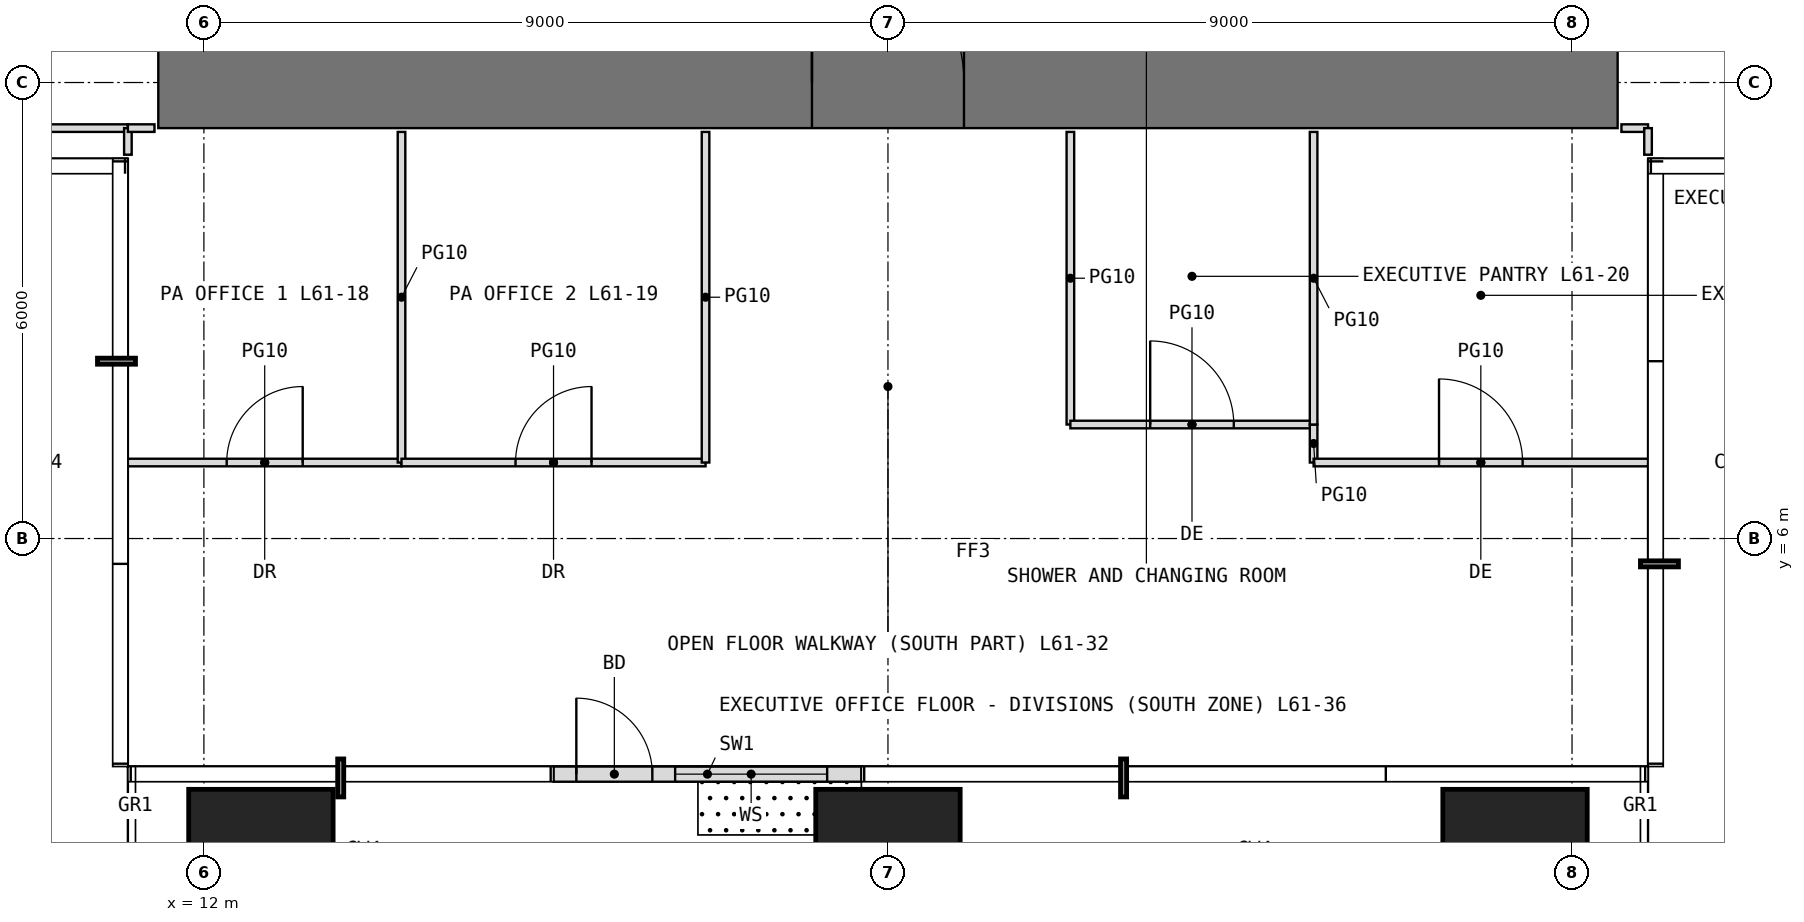
"""IFC4 building model, lengths in metres.
Left out: names, types, materials, properties, quantities, classifications, styles, units other than length and angle.
Written with IfcOpenShell. Run it as: python <this file> out.ifc"""

import sys

from ifc_helpers import new_model, si_unit, direction, frame, frame_2d, origin, origin_2d, place, context, subcontext, project, spatial, rectangle, extrude, element, fill, save


model = new_model("IFC4")
c1 = context("Model", 3, precision=1e-05, world=origin(), true_north=direction((0.0, 1.0)))
c2 = subcontext(c1, "Body", "Model", "MODEL_VIEW")
j1 = project(units=[si_unit("LENGTHUNIT", "METRE"), si_unit("PLANEANGLEUNIT", "RADIAN")], contexts=[c1])
p1 = place(None, origin())
s1 = spatial("IfcSite", under=j1, at=p1, CompositionType="ELEMENT")
p2 = place(p1, origin())
s2 = spatial("IfcBuilding", under=s1, at=p2, CompositionType="ELEMENT")
p3 = place(p2, frame((0.0, 0.0, 256.6)))
s3 = spatial("IfcBuildingStorey", under=s2, at=p3, CompositionType="ELEMENT", Elevation=256.6)
for number, where, z_axis, x_axis in (
    (1, (12.75, 1.75, 0.0), (0.0, 0.0, 1.0), (1.0, 0.0, 0.0)),
    (2, (21.0, 1.75, 0.0), (0.0, 0.0, 1.0), (1.0, 0.0, 0.0)),
    (3, (29.25, 1.75, 0.0), (0.0, 0.0, 1.0), (1.0, 0.0, 0.0)),
):
    element("IfcColumn", number, at=place(p3, frame(where, z_axis=z_axis, x_axis=x_axis)), inside=s3, PredefinedType="COLUMN", context=c2, shape_type="SweptSolid", body=[
        extrude(rectangle(XDim=1.9, YDim=1.9, at=origin_2d()), origin(), (0.0, 0.0, 1.0), 4.2),
    ])
p4 = place(p3, frame((16.6, 2.9, 0.0), z_axis=(0.0, 0.0, 1.0), x_axis=(1.0, 0.0, 0.0)))
e4 = element("IfcWall", 4, at=p4, inside=s3, PredefinedType="USERDEFINED", context=c2, shape_type="SweptSolid", body=[
    extrude(rectangle(XDim=4.05, YDim=0.2, at=frame_2d((2.025, 0.0))), origin(), (0.0, 0.0, 1.0), 3.95),
])
p5 = place(p4, frame((0.3, 0.0, 0.0)))
e5 = element("IfcOpeningElement", 5, at=p5, cuts=e4, PredefinedType="OPENING", context=c2, shape_type="SweptSolid", body=[
    extrude(rectangle(XDim=1.0, YDim=2.4, at=frame_2d((0.5, 1.2))), frame((0.0, 0.11, 0.0), z_axis=(0.0, -1.0, 0.0), x_axis=(1.0, 0.0, 0.0)), (0.0, 0.0, 1.0), 0.22),
])
p6 = place(p4, frame((1.6, 0.0, 0.3)))
e6 = element("IfcOpeningElement", 6, at=p6, cuts=e4, PredefinedType="OPENING", context=c2, shape_type="SweptSolid", body=[
    extrude(rectangle(XDim=2.0, YDim=2.7, at=frame_2d((1.0, 1.35))), frame((0.0, 0.11, 0.0), z_axis=(0.0, -1.0, 0.0), x_axis=(1.0, 0.0, 0.0)), (0.0, 0.0, 1.0), 0.22),
])
p7 = place(p3, frame((11.4, 12.0, -0.05), z_axis=(0.0, 0.0, 1.0), x_axis=(1.0, 0.0, 0.0)))
e7 = element("IfcWall", 7, at=p7, inside=s3, PredefinedType="SHEAR", context=c2, shape_type="SweptSolid", body=[
    extrude(rectangle(XDim=19.2, YDim=1.2, at=frame_2d((9.6, 0.0))), origin(), (0.0, 0.0, 1.0), 4.2),
])
p8 = place(p7, frame((8.6, 0.0, 0.05)))
e8 = element("IfcOpeningElement", 8, at=p8, cuts=e7, PredefinedType="OPENING", context=c2, shape_type="SweptSolid", body=[
    extrude(rectangle(XDim=2.0, YDim=2.2, at=frame_2d((1.0, 1.1))), frame((0.0, 0.61, 0.0), z_axis=(0.0, -1.0, 0.0), x_axis=(1.0, 0.0, 0.0)), (0.0, 0.0, 1.0), 1.22),
])
p9 = place(p3, frame((8.4, 11.4, 0.0), z_axis=(0.0, 0.0, 1.0), x_axis=(1.0, 0.0, 0.0)))
e9 = element("IfcWall", 9, at=p9, inside=s3, PredefinedType="PARTITIONING", context=c2, shape_type="SweptSolid", body=[
    extrude(rectangle(XDim=2.6, YDim=0.1, at=frame_2d((1.3, 0.0))), origin(), (0.0, 0.0, 1.0), 3.95),
])
p10 = place(p3, frame((11.0, 7.0, 0.0), z_axis=(0.0, 0.0, 1.0), x_axis=(1.0, 0.0, 0.0)))
e10 = element("IfcWall", 10, at=p10, inside=s3, PredefinedType="PARTITIONING", context=c2, shape_type="SweptSolid", body=[
    extrude(rectangle(XDim=3.6, YDim=0.1, at=frame_2d((1.8, 0.0))), origin(), (0.0, 0.0, 1.0), 3.95),
])
p11 = place(p10, frame((1.3, 0.0, 0.0)))
e11 = element("IfcOpeningElement", 11, at=p11, cuts=e10, PredefinedType="OPENING", context=c2, shape_type="SweptSolid", body=[
    extrude(rectangle(XDim=1.0, YDim=2.2, at=frame_2d((0.5, 1.1))), frame((0.0, 0.06, 0.0), z_axis=(0.0, -1.0, 0.0), x_axis=(1.0, 0.0, 0.0)), (0.0, 0.0, 1.0), 0.12),
])
p12 = place(p3, frame((11.0, 11.05, 0.0), z_axis=(0.0, 0.0, 1.0), x_axis=(0.0, 1.0, 0.0)))
e12 = element("IfcWall", 12, at=p12, inside=s3, PredefinedType="PARTITIONING", context=c2, shape_type="SweptSolid", body=[
    extrude(rectangle(XDim=0.35, YDim=0.1, at=frame_2d((0.175, 0.0))), origin(), (0.0, 0.0, 1.0), 3.95),
])
p13 = place(p3, frame((11.0, 11.4, 0.0), z_axis=(0.0, 0.0, 1.0), x_axis=(1.0, 0.0, 0.0)))
e13 = element("IfcWall", 13, at=p13, inside=s3, PredefinedType="PARTITIONING", context=c2, shape_type="SweptSolid", body=[
    extrude(rectangle(XDim=0.35, YDim=0.1, at=frame_2d((0.175, 0.0))), origin(), (0.0, 0.0, 1.0), 3.95),
])
p14 = place(p3, frame((14.6, 7.0, 0.0), z_axis=(0.0, 0.0, 1.0), x_axis=(0.0, 1.0, 0.0)))
e14 = element("IfcWall", 14, at=p14, inside=s3, PredefinedType="PARTITIONING", context=c2, shape_type="SweptSolid", body=[
    extrude(rectangle(XDim=4.35, YDim=0.1, at=frame_2d((2.175, 0.0))), origin(), (0.0, 0.0, 1.0), 3.95),
])
p15 = place(p3, frame((14.6, 7.0, 0.0), z_axis=(0.0, 0.0, 1.0), x_axis=(1.0, 0.0, 0.0)))
e15 = element("IfcWall", 15, at=p15, inside=s3, PredefinedType="PARTITIONING", context=c2, shape_type="SweptSolid", body=[
    extrude(rectangle(XDim=4.0, YDim=0.1, at=frame_2d((2.0, 0.0))), origin(), (0.0, 0.0, 1.0), 3.95),
])
p16 = place(p15, frame((1.5, 0.0, 0.0)))
e16 = element("IfcOpeningElement", 16, at=p16, cuts=e15, PredefinedType="OPENING", context=c2, shape_type="SweptSolid", body=[
    extrude(rectangle(XDim=1.0, YDim=2.2, at=frame_2d((0.5, 1.1))), frame((0.0, 0.06, 0.0), z_axis=(0.0, -1.0, 0.0), x_axis=(1.0, 0.0, 0.0)), (0.0, 0.0, 1.0), 0.12),
])
p17 = place(p3, frame((18.6, 7.0, 0.0), z_axis=(0.0, 0.0, 1.0), x_axis=(0.0, 1.0, 0.0)))
e17 = element("IfcWall", 17, at=p17, inside=s3, PredefinedType="PARTITIONING", context=c2, shape_type="SweptSolid", body=[
    extrude(rectangle(XDim=4.35, YDim=0.1, at=frame_2d((2.175, 0.0))), origin(), (0.0, 0.0, 1.0), 3.95),
])
p18 = place(p3, frame((23.4, 7.5, 0.0), z_axis=(0.0, 0.0, 1.0), x_axis=(0.0, 1.0, 0.0)))
e18 = element("IfcWall", 18, at=p18, inside=s3, PredefinedType="PARTITIONING", context=c2, shape_type="SweptSolid", body=[
    extrude(rectangle(XDim=3.85, YDim=0.1, at=frame_2d((1.925, 0.0))), origin(), (0.0, 0.0, 1.0), 3.95),
])
p19 = place(p3, frame((23.4, 7.5, 0.0), z_axis=(0.0, 0.0, 1.0), x_axis=(1.0, 0.0, 0.0)))
e19 = element("IfcWall", 19, at=p19, inside=s3, PredefinedType="PARTITIONING", context=c2, shape_type="SweptSolid", body=[
    extrude(rectangle(XDim=3.2, YDim=0.1, at=frame_2d((1.6, 0.0))), origin(), (0.0, 0.0, 1.0), 3.95),
])
p20 = place(p19, frame((1.05, 0.0, 0.0)))
e20 = element("IfcOpeningElement", 20, at=p20, cuts=e19, PredefinedType="OPENING", context=c2, shape_type="SweptSolid", body=[
    extrude(rectangle(XDim=1.1, YDim=2.3, at=frame_2d((0.55, 1.15))), frame((0.0, 0.06, 0.0), z_axis=(0.0, -1.0, 0.0), x_axis=(1.0, 0.0, 0.0)), (0.0, 0.0, 1.0), 0.12),
])
p21 = place(p3, frame((26.6, 7.0, 0.0), z_axis=(0.0, 0.0, 1.0), x_axis=(0.0, 1.0, 0.0)))
e21 = element("IfcWall", 21, at=p21, inside=s3, PredefinedType="PARTITIONING", context=c2, shape_type="SweptSolid", body=[
    extrude(rectangle(XDim=0.5, YDim=0.1, at=frame_2d((0.25, 0.0))), origin(), (0.0, 0.0, 1.0), 3.95),
])
p22 = place(p3, frame((26.6, 7.0, 0.0), z_axis=(0.0, 0.0, 1.0), x_axis=(1.0, 0.0, 0.0)))
e22 = element("IfcWall", 22, at=p22, inside=s3, PredefinedType="PARTITIONING", context=c2, shape_type="SweptSolid", body=[
    extrude(rectangle(XDim=4.4, YDim=0.1, at=frame_2d((2.2, 0.0))), origin(), (0.0, 0.0, 1.0), 3.95),
])
p23 = place(p22, frame((1.65, 0.0, 0.0)))
e23 = element("IfcOpeningElement", 23, at=p23, cuts=e22, PredefinedType="OPENING", context=c2, shape_type="SweptSolid", body=[
    extrude(rectangle(XDim=1.1, YDim=2.3, at=frame_2d((0.55, 1.15))), frame((0.0, 0.06, 0.0), z_axis=(0.0, -1.0, 0.0), x_axis=(1.0, 0.0, 0.0)), (0.0, 0.0, 1.0), 0.12),
])
p24 = place(p3, frame((26.6, 7.5, 0.0), z_axis=(0.0, 0.0, 1.0), x_axis=(0.0, 1.0, 0.0)))
e24 = element("IfcWall", 24, at=p24, inside=s3, PredefinedType="PARTITIONING", context=c2, shape_type="SweptSolid", body=[
    extrude(rectangle(XDim=3.85, YDim=0.1, at=frame_2d((1.925, 0.0))), origin(), (0.0, 0.0, 1.0), 3.95),
])
p25 = place(p3, frame((30.65, 11.4, 0.0), z_axis=(0.0, 0.0, 1.0), x_axis=(1.0, 0.0, 0.0)))
e25 = element("IfcWall", 25, at=p25, inside=s3, PredefinedType="PARTITIONING", context=c2, shape_type="SweptSolid", body=[
    extrude(rectangle(XDim=0.35, YDim=0.1, at=frame_2d((0.175, 0.0))), origin(), (0.0, 0.0, 1.0), 3.95),
])
p26 = place(p3, frame((31.0, 11.05, 0.0), z_axis=(0.0, 0.0, 1.0), x_axis=(0.0, 1.0, 0.0)))
e26 = element("IfcWall", 26, at=p26, inside=s3, PredefinedType="PARTITIONING", context=c2, shape_type="SweptSolid", body=[
    extrude(rectangle(XDim=0.35, YDim=0.1, at=frame_2d((0.175, 0.0))), origin(), (0.0, 0.0, 1.0), 3.95),
])
p27 = place(p5, origin())
e27 = element("IfcDoor", 27, at=p27, inside=s3, OperationType="SINGLE_SWING_LEFT", PredefinedType="DOOR", context=c2, shape_type="SweptSolid", body=[
    extrude(rectangle(XDim=1.0, YDim=2.4, at=frame_2d((0.5, 1.2))), frame((0.0, 0.025, 0.0), z_axis=(0.0, -1.0, 0.0), x_axis=(1.0, 0.0, 0.0)), (0.0, 0.0, 1.0), 0.05),
])
fill(e5, e27)
p28 = place(p6, origin())
e28 = element("IfcWindow", 28, at=p28, inside=s3, PartitioningType="SINGLE_PANEL", PredefinedType="WINDOW", context=c2, shape_type="SweptSolid", body=[
    extrude(rectangle(XDim=2.0, YDim=2.7, at=frame_2d((1.0, 1.35))), frame((0.0, 0.03, 0.0), z_axis=(0.0, -1.0, 0.0), x_axis=(1.0, 0.0, 0.0)), (0.0, 0.0, 1.0), 0.06),
])
fill(e6, e28)
p29 = place(p8, origin())
e29 = element("IfcDoor", 29, at=p29, inside=s3, OperationType="DOUBLE_DOOR_SINGLE_SWING", PredefinedType="DOOR", context=c2, shape_type="SweptSolid", body=[
    extrude(rectangle(XDim=2.0, YDim=2.2, at=frame_2d((1.0, 1.1))), frame((0.0, 0.025, 0.0), z_axis=(0.0, -1.0, 0.0), x_axis=(1.0, 0.0, 0.0)), (0.0, 0.0, 1.0), 0.05),
])
fill(e8, e29)
p30 = place(p11, origin())
e30 = element("IfcDoor", 30, at=p30, inside=s3, OperationType="SINGLE_SWING_RIGHT", PredefinedType="DOOR", context=c2, shape_type="SweptSolid", body=[
    extrude(rectangle(XDim=1.0, YDim=2.2, at=frame_2d((0.5, 1.1))), frame((0.0, 0.025, 0.0), z_axis=(0.0, -1.0, 0.0), x_axis=(1.0, 0.0, 0.0)), (0.0, 0.0, 1.0), 0.05),
])
fill(e11, e30)
p31 = place(p16, origin())
e31 = element("IfcDoor", 31, at=p31, inside=s3, OperationType="SINGLE_SWING_RIGHT", PredefinedType="DOOR", context=c2, shape_type="SweptSolid", body=[
    extrude(rectangle(XDim=1.0, YDim=2.2, at=frame_2d((0.5, 1.1))), frame((0.0, 0.025, 0.0), z_axis=(0.0, -1.0, 0.0), x_axis=(1.0, 0.0, 0.0)), (0.0, 0.0, 1.0), 0.05),
])
fill(e16, e31)
p32 = place(p20, origin())
e32 = element("IfcDoor", 32, at=p32, inside=s3, OperationType="SINGLE_SWING_LEFT", PredefinedType="DOOR", context=c2, shape_type="SweptSolid", body=[
    extrude(rectangle(XDim=1.1, YDim=2.3, at=frame_2d((0.55, 1.15))), frame((0.0, 0.025, 0.0), z_axis=(0.0, -1.0, 0.0), x_axis=(1.0, 0.0, 0.0)), (0.0, 0.0, 1.0), 0.05),
])
fill(e20, e32)
p33 = place(p23, origin())
e33 = element("IfcDoor", 33, at=p33, inside=s3, OperationType="SINGLE_SWING_LEFT", PredefinedType="DOOR", context=c2, shape_type="SweptSolid", body=[
    extrude(rectangle(XDim=1.1, YDim=2.3, at=frame_2d((0.55, 1.15))), frame((0.0, 0.025, 0.0), z_axis=(0.0, -1.0, 0.0), x_axis=(1.0, 0.0, 0.0)), (0.0, 0.0, 1.0), 0.05),
])
fill(e23, e33)
save(model, sys.argv[1])
